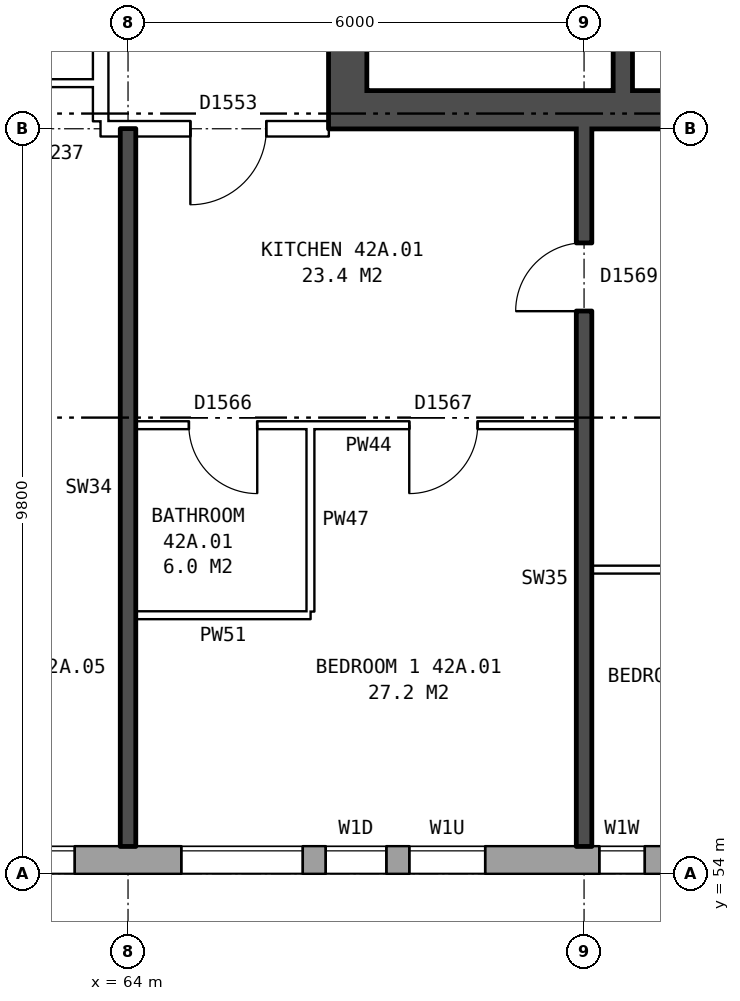
"""IFC4 building model, lengths in metres.
Left out: names, types, materials, properties, quantities, classifications, styles, units other than length and angle.
Written with IfcOpenShell. Run it as: python <this file> out.ifc"""

import sys

from ifc_helpers import new_model, si_unit, direction, frame, frame_2d, origin, place, context, subcontext, project, spatial, rectangle, extrude, element, fill, save


model = new_model("IFC4")
c1 = context("Model", 3, precision=1e-05, world=origin(), true_north=direction((0.0, 1.0)))
c2 = subcontext(c1, "Body", "Model", "MODEL_VIEW")
j1 = project(units=[si_unit("LENGTHUNIT", "METRE"), si_unit("PLANEANGLEUNIT", "RADIAN")], contexts=[c1])
p1 = place(None, origin())
s1 = spatial("IfcSite", under=j1, at=p1, CompositionType="ELEMENT")
p2 = place(p1, origin())
s2 = spatial("IfcBuilding", under=s1, at=p2, CompositionType="ELEMENT")
p3 = place(p2, frame((0.0, 0.0, 151.6)))
s3 = spatial("IfcBuildingStorey", under=s2, at=p3, CompositionType="ELEMENT", Elevation=151.6)
p4 = place(p3, frame((31.575, 54.18, 0.0), z_axis=(0.0, 0.0, 1.0), x_axis=(1.0, 0.0, 0.0)))
e1 = element("IfcWall", 1, at=p4, inside=s3, PredefinedType="STANDARD", context=c2, shape_type="SweptSolid", body=[
    extrude(rectangle(XDim=41.351, YDim=0.36, at=frame_2d((20.675, 0.0))), origin(), (0.0, 0.0, 1.0), 2.85),
])
p5 = place(p4, frame((4.625, 0.0, 0.8)))
e2 = element("IfcOpeningElement", 2, at=p5, cuts=e1, PredefinedType="OPENING", context=c2, shape_type="SweptSolid", body=[
    extrude(rectangle(XDim=1.2, YDim=1.2, at=frame_2d((0.6, 0.6))), frame((0.0, 0.19, 0.0), z_axis=(0.0, -1.0, 0.0), x_axis=(1.0, 0.0, 0.0)), (0.0, 0.0, 1.0), 0.38),
])
p6 = place(p4, frame((6.125, 0.0, 0.8)))
e3 = element("IfcOpeningElement", 3, at=p6, cuts=e1, PredefinedType="OPENING", context=c2, shape_type="SweptSolid", body=[
    extrude(rectangle(XDim=1.6, YDim=1.8, at=frame_2d((0.8, 0.9))), frame((0.0, 0.19, 0.0), z_axis=(0.0, -1.0, 0.0), x_axis=(1.0, 0.0, 0.0)), (0.0, 0.0, 1.0), 0.38),
])
p7 = place(p4, frame((9.125, 0.0, 0.8)))
e4 = element("IfcOpeningElement", 4, at=p7, cuts=e1, PredefinedType="OPENING", context=c2, shape_type="SweptSolid", body=[
    extrude(rectangle(XDim=1.6, YDim=1.8, at=frame_2d((0.8, 0.9))), frame((0.0, 0.19, 0.0), z_axis=(0.0, -1.0, 0.0), x_axis=(1.0, 0.0, 0.0)), (0.0, 0.0, 1.0), 0.38),
])
p8 = place(p4, frame((12.125, 0.0, 0.8)))
e5 = element("IfcOpeningElement", 5, at=p8, cuts=e1, PredefinedType="OPENING", context=c2, shape_type="SweptSolid", body=[
    extrude(rectangle(XDim=1.6, YDim=1.8, at=frame_2d((0.8, 0.9))), frame((0.0, 0.19, 0.0), z_axis=(0.0, -1.0, 0.0), x_axis=(1.0, 0.0, 0.0)), (0.0, 0.0, 1.0), 0.38),
])
p9 = place(p4, frame((15.125, 0.0, 0.8)))
e6 = element("IfcOpeningElement", 6, at=p9, cuts=e1, PredefinedType="OPENING", context=c2, shape_type="SweptSolid", body=[
    extrude(rectangle(XDim=1.6, YDim=1.8, at=frame_2d((0.8, 0.9))), frame((0.0, 0.19, 0.0), z_axis=(0.0, -1.0, 0.0), x_axis=(1.0, 0.0, 0.0)), (0.0, 0.0, 1.0), 0.38),
])
p10 = place(p4, frame((18.125, 0.0, 0.8)))
e7 = element("IfcOpeningElement", 7, at=p10, cuts=e1, PredefinedType="OPENING", context=c2, shape_type="SweptSolid", body=[
    extrude(rectangle(XDim=1.6, YDim=1.8, at=frame_2d((0.8, 0.9))), frame((0.0, 0.19, 0.0), z_axis=(0.0, -1.0, 0.0), x_axis=(1.0, 0.0, 0.0)), (0.0, 0.0, 1.0), 0.38),
])
p11 = place(p4, frame((21.125, 0.0, 0.8)))
e8 = element("IfcOpeningElement", 8, at=p11, cuts=e1, PredefinedType="OPENING", context=c2, shape_type="SweptSolid", body=[
    extrude(rectangle(XDim=1.6, YDim=1.8, at=frame_2d((0.8, 0.9))), frame((0.0, 0.19, 0.0), z_axis=(0.0, -1.0, 0.0), x_axis=(1.0, 0.0, 0.0)), (0.0, 0.0, 1.0), 0.38),
])
p12 = place(p4, frame((24.125, 0.0, 0.8)))
e9 = element("IfcOpeningElement", 9, at=p12, cuts=e1, PredefinedType="OPENING", context=c2, shape_type="SweptSolid", body=[
    extrude(rectangle(XDim=1.6, YDim=1.8, at=frame_2d((0.8, 0.9))), frame((0.0, 0.19, 0.0), z_axis=(0.0, -1.0, 0.0), x_axis=(1.0, 0.0, 0.0)), (0.0, 0.0, 1.0), 0.38),
])
p13 = place(p4, frame((27.125, 0.0, 0.8)))
e10 = element("IfcOpeningElement", 10, at=p13, cuts=e1, PredefinedType="OPENING", context=c2, shape_type="SweptSolid", body=[
    extrude(rectangle(XDim=1.6, YDim=1.8, at=frame_2d((0.8, 0.9))), frame((0.0, 0.19, 0.0), z_axis=(0.0, -1.0, 0.0), x_axis=(1.0, 0.0, 0.0)), (0.0, 0.0, 1.0), 0.38),
])
p14 = place(p4, frame((30.125, 0.0, 0.8)))
e11 = element("IfcOpeningElement", 11, at=p14, cuts=e1, PredefinedType="OPENING", context=c2, shape_type="SweptSolid", body=[
    extrude(rectangle(XDim=1.6, YDim=1.8, at=frame_2d((0.8, 0.9))), frame((0.0, 0.19, 0.0), z_axis=(0.0, -1.0, 0.0), x_axis=(1.0, 0.0, 0.0)), (0.0, 0.0, 1.0), 0.38),
])
p15 = place(p4, frame((33.125, 0.0, 0.8)))
e12 = element("IfcOpeningElement", 12, at=p15, cuts=e1, PredefinedType="OPENING", context=c2, shape_type="SweptSolid", body=[
    extrude(rectangle(XDim=1.6, YDim=1.8, at=frame_2d((0.8, 0.9))), frame((0.0, 0.19, 0.0), z_axis=(0.0, -1.0, 0.0), x_axis=(1.0, 0.0, 0.0)), (0.0, 0.0, 1.0), 0.38),
])
p16 = place(p4, frame((35.025, 0.0, 0.8)))
e13 = element("IfcOpeningElement", 13, at=p16, cuts=e1, PredefinedType="OPENING", context=c2, shape_type="SweptSolid", body=[
    extrude(rectangle(XDim=0.8, YDim=1.8, at=frame_2d((0.4, 0.9))), frame((0.0, 0.19, 0.0), z_axis=(0.0, -1.0, 0.0), x_axis=(1.0, 0.0, 0.0)), (0.0, 0.0, 1.0), 0.38),
])
p17 = place(p4, frame((38.625, 0.0, 1.5)))
e14 = element("IfcOpeningElement", 14, at=p17, cuts=e1, PredefinedType="OPENING", context=c2, shape_type="SweptSolid", body=[
    extrude(rectangle(XDim=0.6, YDim=0.9, at=frame_2d((0.3, 0.45))), frame((0.0, 0.19, 0.0), z_axis=(0.0, -1.0, 0.0), x_axis=(1.0, 0.0, 0.0)), (0.0, 0.0, 1.0), 0.38),
])
p18 = place(p4, frame((36.125, 0.0, 0.8)))
e15 = element("IfcOpeningElement", 15, at=p18, cuts=e1, PredefinedType="OPENING", context=c2, shape_type="SweptSolid", body=[
    extrude(rectangle(XDim=1.0, YDim=0.9, at=frame_2d((0.5, 0.45))), frame((0.0, 0.19, 0.0), z_axis=(0.0, -1.0, 0.0), x_axis=(1.0, 0.0, 0.0)), (0.0, 0.0, 1.0), 0.38),
])
p19 = place(p4, frame((39.525, 0.0, 0.8)))
e16 = element("IfcOpeningElement", 16, at=p19, cuts=e1, PredefinedType="OPENING", context=c2, shape_type="SweptSolid", body=[
    extrude(rectangle(XDim=1.4, YDim=1.8, at=frame_2d((0.7, 0.9))), frame((0.0, 0.19, 0.0), z_axis=(0.0, -1.0, 0.0), x_axis=(1.0, 0.0, 0.0)), (0.0, 0.0, 1.0), 0.38),
])
p20 = place(p3, frame((66.89, 63.8, 0.0), z_axis=(0.0, 0.0, 1.0), x_axis=(0.0, 1.0, 0.0)))
e17 = element("IfcWall", 17, at=p20, inside=s3, PredefinedType="SHEAR", context=c2, shape_type="SweptSolid", body=[
    extrude(rectangle(XDim=12.4, YDim=0.5, at=frame_2d((6.2, 0.0))), origin(), (0.0, 0.0, 1.0), 2.85),
])
p21 = place(p20, frame((1.325, 0.0, 0.0)))
e18 = element("IfcOpeningElement", 18, at=p21, cuts=e17, PredefinedType="OPENING", context=c2, shape_type="SweptSolid", body=[
    extrude(rectangle(XDim=1.1, YDim=2.1, at=frame_2d((0.55, 1.05))), frame((0.0, 0.26, 0.0), z_axis=(0.0, -1.0, 0.0), x_axis=(1.0, 0.0, 0.0)), (0.0, 0.0, 1.0), 0.52),
])
p22 = place(p20, frame((3.6, 0.0, 0.0)))
e19 = element("IfcOpeningElement", 19, at=p22, cuts=e17, PredefinedType="OPENING", context=c2, shape_type="SweptSolid", body=[
    extrude(rectangle(XDim=1.1, YDim=2.1, at=frame_2d((0.55, 1.05))), frame((0.0, 0.26, 0.0), z_axis=(0.0, -1.0, 0.0), x_axis=(1.0, 0.0, 0.0)), (0.0, 0.0, 1.0), 0.52),
])
p23 = place(p20, frame((5.8, 0.0, 0.0)))
e20 = element("IfcOpeningElement", 20, at=p23, cuts=e17, PredefinedType="OPENING", context=c2, shape_type="SweptSolid", body=[
    extrude(rectangle(XDim=1.1, YDim=2.1, at=frame_2d((0.55, 1.05))), frame((0.0, 0.26, 0.0), z_axis=(0.0, -1.0, 0.0), x_axis=(1.0, 0.0, 0.0)), (0.0, 0.0, 1.0), 0.52),
])
p24 = place(p20, frame((8.0, 0.0, 0.0)))
e21 = element("IfcOpeningElement", 21, at=p24, cuts=e17, PredefinedType="OPENING", context=c2, shape_type="SweptSolid", body=[
    extrude(rectangle(XDim=1.1, YDim=2.1, at=frame_2d((0.55, 1.05))), frame((0.0, 0.26, 0.0), z_axis=(0.0, -1.0, 0.0), x_axis=(1.0, 0.0, 0.0)), (0.0, 0.0, 1.0), 0.52),
])
p25 = place(p20, frame((9.9, 0.0, 0.0)))
e22 = element("IfcOpeningElement", 22, at=p25, cuts=e17, PredefinedType="OPENING", context=c2, shape_type="SweptSolid", body=[
    extrude(rectangle(XDim=1.1, YDim=2.1, at=frame_2d((0.55, 1.05))), frame((0.0, 0.26, 0.0), z_axis=(0.0, -1.0, 0.0), x_axis=(1.0, 0.0, 0.0)), (0.0, 0.0, 1.0), 0.52),
])
p26 = place(p3, frame((67.14, 64.05, 0.0), z_axis=(0.0, 0.0, 1.0), x_axis=(1.0, 0.0, 0.0)))
e23 = element("IfcWall", 23, at=p26, inside=s3, PredefinedType="SHEAR", context=c2, shape_type="SweptSolid", body=[
    extrude(rectangle(XDim=8.0, YDim=0.5, at=frame_2d((4.0, 0.0))), origin(), (0.0, 0.0, 1.0), 2.85),
])
p27 = place(p3, frame((70.51, 64.3, 0.0), z_axis=(0.0, 0.0, 1.0), x_axis=(0.0, 1.0, 0.0)))
e24 = element("IfcWall", 24, at=p27, inside=s3, PredefinedType="SHEAR", context=c2, shape_type="SweptSolid", body=[
    extrude(rectangle(XDim=2.425, YDim=0.25, at=frame_2d((1.212, 0.0))), origin(), (0.0, 0.0, 1.0), 2.85),
])
p28 = place(p3, frame((63.64, 63.9, 0.0), z_axis=(0.0, 0.0, 1.0), x_axis=(0.0, 1.0, 0.0)))
e25 = element("IfcWall", 25, at=p28, inside=s3, PredefinedType="PARTITIONING", context=c2, shape_type="SweptSolid", body=[
    extrude(rectangle(XDim=12.2, YDim=0.2, at=frame_2d((6.1, 0.0))), origin(), (0.0, 0.0, 1.0), 2.85),
])
p29 = place(p28, frame((5.1, 0.0, 0.0)))
e26 = element("IfcOpeningElement", 26, at=p29, cuts=e25, PredefinedType="OPENING", context=c2, shape_type="SweptSolid", body=[
    extrude(rectangle(XDim=2.0, YDim=2.1, at=frame_2d((1.0, 1.05))), frame((0.0, 0.11, 0.0), z_axis=(0.0, -1.0, 0.0), x_axis=(1.0, 0.0, 0.0)), (0.0, 0.0, 1.0), 0.22),
])
p30 = place(p3, frame((64.1, 57.4, 0.0), z_axis=(0.0, 0.0, 1.0), x_axis=(1.0, 0.0, 0.0)))
e27 = element("IfcWall", 27, at=p30, inside=s3, PredefinedType="PARTITIONING", context=c2, shape_type="SweptSolid", body=[
    extrude(rectangle(XDim=2.3, YDim=0.1, at=frame_2d((1.15, 0.0))), origin(), (0.0, 0.0, 1.0), 2.85),
])
p31 = place(p3, frame((70.1, 58.0, 0.0), z_axis=(0.0, 0.0, 1.0), x_axis=(1.0, 0.0, 0.0)))
e28 = element("IfcWall", 28, at=p31, inside=s3, PredefinedType="PARTITIONING", context=c2, shape_type="SweptSolid", body=[
    extrude(rectangle(XDim=5.54, YDim=0.1, at=frame_2d((2.77, 0.0))), origin(), (0.0, 0.0, 1.0), 2.85),
])
p32 = place(p31, frame((2.32, 0.0, 0.0)))
e29 = element("IfcOpeningElement", 29, at=p32, cuts=e28, PredefinedType="OPENING", context=c2, shape_type="SweptSolid", body=[
    extrude(rectangle(XDim=0.9, YDim=2.1, at=frame_2d((0.45, 1.05))), frame((0.0, 0.06, 0.0), z_axis=(0.0, -1.0, 0.0), x_axis=(1.0, 0.0, 0.0)), (0.0, 0.0, 1.0), 0.12),
])
p33 = place(p3, frame((64.1, 59.9, 0.0), z_axis=(0.0, 0.0, 1.0), x_axis=(1.0, 0.0, 0.0)))
e30 = element("IfcWall", 30, at=p33, inside=s3, PredefinedType="PARTITIONING", context=c2, shape_type="SweptSolid", body=[
    extrude(rectangle(XDim=5.8, YDim=0.1, at=frame_2d((2.9, 0.0))), origin(), (0.0, 0.0, 1.0), 2.85),
])
p34 = place(p33, frame((3.6, 0.0, 0.0)))
e31 = element("IfcOpeningElement", 31, at=p34, cuts=e30, PredefinedType="OPENING", context=c2, shape_type="SweptSolid", body=[
    extrude(rectangle(XDim=0.9, YDim=2.1, at=frame_2d((0.45, 1.05))), frame((0.0, 0.06, 0.0), z_axis=(0.0, -1.0, 0.0), x_axis=(1.0, 0.0, 0.0)), (0.0, 0.0, 1.0), 0.12),
])
p35 = place(p33, frame((0.7, 0.0, 0.0)))
e32 = element("IfcOpeningElement", 32, at=p35, cuts=e30, PredefinedType="OPENING", context=c2, shape_type="SweptSolid", body=[
    extrude(rectangle(XDim=0.9, YDim=2.1, at=frame_2d((0.45, 1.05))), frame((0.0, 0.06, 0.0), z_axis=(0.0, -1.0, 0.0), x_axis=(1.0, 0.0, 0.0)), (0.0, 0.0, 1.0), 0.12),
])
p36 = place(p3, frame((63.64, 63.8, 0.0), z_axis=(0.0, 0.0, 1.0), x_axis=(1.0, 0.0, 0.0)))
e33 = element("IfcWall", 33, at=p36, inside=s3, PredefinedType="PARTITIONING", context=c2, shape_type="SweptSolid", body=[
    extrude(rectangle(XDim=3.0, YDim=0.2, at=frame_2d((1.5, 0.0))), origin(), (0.0, 0.0, 1.0), 2.85),
])
p37 = place(p36, frame((1.18, 0.0, 0.0)))
e34 = element("IfcOpeningElement", 34, at=p37, cuts=e33, PredefinedType="OPENING", context=c2, shape_type="SweptSolid", body=[
    extrude(rectangle(XDim=1.0, YDim=2.1, at=frame_2d((0.5, 1.05))), frame((0.0, 0.11, 0.0), z_axis=(0.0, -1.0, 0.0), x_axis=(1.0, 0.0, 0.0)), (0.0, 0.0, 1.0), 0.22),
])
p38 = place(p3, frame((61.0, 64.4, 0.0), z_axis=(0.0, 0.0, 1.0), x_axis=(1.0, 0.0, 0.0)))
e35 = element("IfcWall", 35, at=p38, inside=s3, PredefinedType="PARTITIONING", context=c2, shape_type="SweptSolid", body=[
    extrude(rectangle(XDim=2.64, YDim=0.1, at=frame_2d((1.32, 0.0))), origin(), (0.0, 0.0, 1.0), 2.85),
])
p39 = place(p3, frame((64.0, 54.36, 0.0), z_axis=(0.0, 0.0, 1.0), x_axis=(0.0, 1.0, 0.0)))
e36 = element("IfcWall", 36, at=p39, inside=s3, PredefinedType="SOLIDWALL", context=c2, shape_type="SweptSolid", body=[
    extrude(rectangle(XDim=9.44, YDim=0.2, at=frame_2d((4.72, 0.0))), origin(), (0.0, 0.0, 1.0), 2.85),
])
p40 = place(p3, frame((66.4, 57.45, 0.0), z_axis=(0.0, 0.0, 1.0), x_axis=(0.0, 1.0, 0.0)))
e37 = element("IfcWall", 37, at=p40, inside=s3, PredefinedType="PARTITIONING", context=c2, shape_type="SweptSolid", body=[
    extrude(rectangle(XDim=2.4, YDim=0.1, at=frame_2d((1.2, 0.0))), origin(), (0.0, 0.0, 1.0), 2.85),
])
p41 = place(p3, frame((70.0, 54.36, 0.0), z_axis=(0.0, 0.0, 1.0), x_axis=(0.0, 1.0, 0.0)))
e38 = element("IfcWall", 38, at=p41, inside=s3, PredefinedType="SOLIDWALL", context=c2, shape_type="SweptSolid", body=[
    extrude(rectangle(XDim=9.44, YDim=0.2, at=frame_2d((4.72, 0.0))), origin(), (0.0, 0.0, 1.0), 2.85),
])
p42 = place(p41, frame((7.04, 0.0, 0.0)))
e39 = element("IfcOpeningElement", 39, at=p42, cuts=e38, PredefinedType="OPENING", context=c2, shape_type="SweptSolid", body=[
    extrude(rectangle(XDim=0.9, YDim=2.1, at=frame_2d((0.45, 1.05))), frame((0.0, 0.11, 0.0), z_axis=(0.0, -1.0, 0.0), x_axis=(1.0, 0.0, 0.0)), (0.0, 0.0, 1.0), 0.22),
])
p43 = place(p14, origin())
e40 = element("IfcWindow", 40, at=p43, inside=s3, PartitioningType="SINGLE_PANEL", PredefinedType="WINDOW", context=c2, shape_type="SweptSolid", body=[
    extrude(rectangle(XDim=1.6, YDim=1.8, at=frame_2d((0.8, 0.9))), frame((0.0, 0.15, 0.0), z_axis=(0.0, -1.0, 0.0), x_axis=(1.0, 0.0, 0.0)), (0.0, 0.0, 1.0), 0.06),
])
fill(e11, e40)
p44 = place(p15, origin())
e41 = element("IfcWindow", 41, at=p44, inside=s3, PartitioningType="SINGLE_PANEL", PredefinedType="WINDOW", context=c2, shape_type="SweptSolid", body=[
    extrude(rectangle(XDim=1.6, YDim=1.8, at=frame_2d((0.8, 0.9))), frame((0.0, 0.15, 0.0), z_axis=(0.0, -1.0, 0.0), x_axis=(1.0, 0.0, 0.0)), (0.0, 0.0, 1.0), 0.06),
])
fill(e12, e41)
p45 = place(p16, origin())
e42 = element("IfcWindow", 42, at=p45, inside=s3, PartitioningType="SINGLE_PANEL", PredefinedType="WINDOW", context=c2, shape_type="SweptSolid", body=[
    extrude(rectangle(XDim=0.8, YDim=1.8, at=frame_2d((0.4, 0.9))), frame((0.0, 0.15, 0.0), z_axis=(0.0, -1.0, 0.0), x_axis=(1.0, 0.0, 0.0)), (0.0, 0.0, 1.0), 0.06),
])
fill(e13, e42)
p46 = place(p17, origin())
e43 = element("IfcWindow", 43, at=p46, inside=s3, PartitioningType="SINGLE_PANEL", PredefinedType="WINDOW", context=c2, shape_type="SweptSolid", body=[
    extrude(rectangle(XDim=0.6, YDim=0.9, at=frame_2d((0.3, 0.45))), frame((0.0, 0.15, 0.0), z_axis=(0.0, -1.0, 0.0), x_axis=(1.0, 0.0, 0.0)), (0.0, 0.0, 1.0), 0.06),
])
fill(e14, e43)
p47 = place(p34, frame((0.9, 0.0, 0.0), z_axis=(0.0, 0.0, 1.0), x_axis=(-1.0, 0.0, 0.0)))
e44 = element("IfcDoor", 44, at=p47, inside=s3, OperationType="SINGLE_SWING_RIGHT", PredefinedType="DOOR", context=c2, shape_type="SweptSolid", body=[
    extrude(rectangle(XDim=0.9, YDim=2.1, at=frame_2d((0.45, 1.05))), frame((0.0, 0.025, 0.0), z_axis=(0.0, -1.0, 0.0), x_axis=(1.0, 0.0, 0.0)), (0.0, 0.0, 1.0), 0.05),
])
fill(e31, e44)
p48 = place(p37, frame((1.0, 0.0, 0.0), z_axis=(0.0, 0.0, 1.0), x_axis=(-1.0, 0.0, 0.0)))
e45 = element("IfcDoor", 45, at=p48, inside=s3, OperationType="SINGLE_SWING_RIGHT", PredefinedType="DOOR", context=c2, shape_type="SweptSolid", body=[
    extrude(rectangle(XDim=1.0, YDim=2.1, at=frame_2d((0.5, 1.05))), frame((0.0, 0.025, 0.0), z_axis=(0.0, -1.0, 0.0), x_axis=(1.0, 0.0, 0.0)), (0.0, 0.0, 1.0), 0.05),
])
fill(e34, e45)
p49 = place(p42, origin())
e46 = element("IfcDoor", 46, at=p49, inside=s3, OperationType="SINGLE_SWING_LEFT", PredefinedType="DOOR", context=c2, shape_type="SweptSolid", body=[
    extrude(rectangle(XDim=0.9, YDim=2.1, at=frame_2d((0.45, 1.05))), frame((0.0, 0.025, 0.0), z_axis=(0.0, -1.0, 0.0), x_axis=(1.0, 0.0, 0.0)), (0.0, 0.0, 1.0), 0.05),
])
fill(e39, e46)
p50 = place(p35, frame((0.9, 0.0, 0.0), z_axis=(0.0, 0.0, 1.0), x_axis=(-1.0, 0.0, 0.0)))
e47 = element("IfcDoor", 47, at=p50, inside=s3, OperationType="SINGLE_SWING_LEFT", PredefinedType="DOOR", context=c2, shape_type="SweptSolid", body=[
    extrude(rectangle(XDim=0.9, YDim=2.1, at=frame_2d((0.45, 1.05))), frame((0.0, 0.025, 0.0), z_axis=(0.0, -1.0, 0.0), x_axis=(1.0, 0.0, 0.0)), (0.0, 0.0, 1.0), 0.05),
])
fill(e32, e47)
p51 = place(p18, origin())
e48 = element("IfcWindow", 48, at=p51, inside=s3, PartitioningType="SINGLE_PANEL", PredefinedType="WINDOW", context=c2, shape_type="SweptSolid", body=[
    extrude(rectangle(XDim=1.0, YDim=0.9, at=frame_2d((0.5, 0.45))), frame((0.0, 0.15, 0.0), z_axis=(0.0, -1.0, 0.0), x_axis=(1.0, 0.0, 0.0)), (0.0, 0.0, 1.0), 0.06),
])
fill(e15, e48)
save(model, sys.argv[1])
